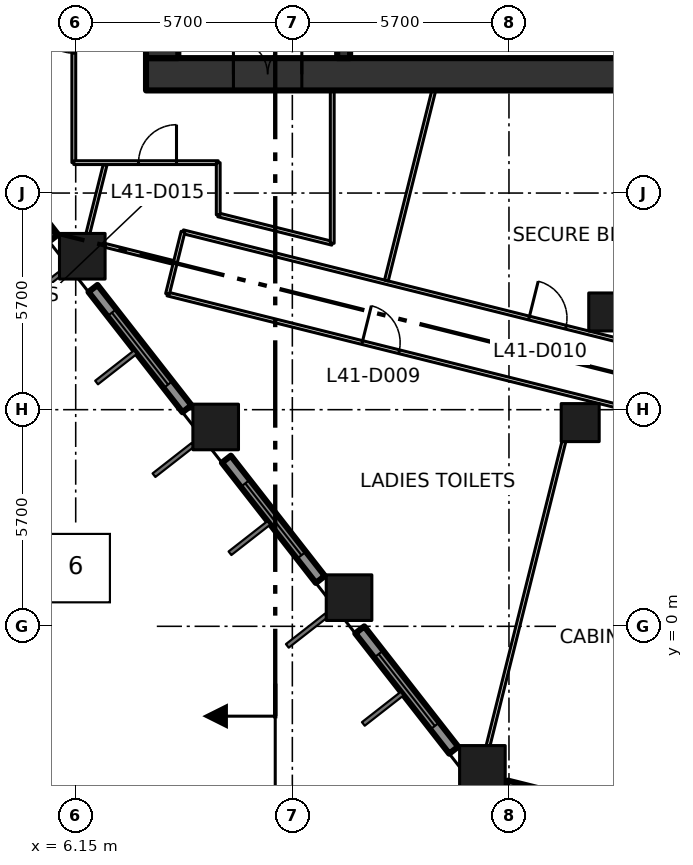
"""IFC4 building model, lengths in metres.
Left out: names, types, materials, properties, quantities, classifications, styles, units other than length and angle.
Written with IfcOpenShell. Run it as: python <this file> out.ifc"""

import sys

from ifc_helpers import new_model, si_unit, direction, frame, frame_2d, origin, origin_2d, place, context, subcontext, project, spatial, rectangle, extrude, element, fill, save


model = new_model("IFC4")
c1 = context("Model", 3, precision=1e-05, world=origin(), true_north=direction((0.0, 1.0)))
c2 = subcontext(c1, "Body", "Model", "MODEL_VIEW")
j1 = project(units=[si_unit("LENGTHUNIT", "METRE"), si_unit("PLANEANGLEUNIT", "RADIAN")], contexts=[c1])
p1 = place(None, origin())
s1 = spatial("IfcSite", under=j1, at=p1, CompositionType="ELEMENT")
p2 = place(p1, origin())
s2 = spatial("IfcBuilding", under=s1, at=p2, CompositionType="ELEMENT")
p3 = place(p2, frame((0.0, 0.0, 182.4)))
s3 = spatial("IfcBuildingStorey", under=s2, at=p3, CompositionType="ELEMENT", Elevation=182.4)
for number, where, z_axis, x_axis in (
    (1, (16.851, -3.738, 0.0), (0.0, 0.0, 1.0), (1.0, 0.0, 0.0)),
    (2, (13.342, 0.754, 0.0), (0.0, 0.0, 1.0), (1.0, 0.0, 0.0)),
    (3, (9.833, 5.245, 0.0), (0.0, 0.0, 1.0), (1.0, 0.0, 0.0)),
    (4, (6.323, 9.737, 0.0), (0.0, 0.0, 1.0), (1.0, 0.0, 0.0)),
):
    element("IfcColumn", number, at=place(p3, frame(where, z_axis=z_axis, x_axis=x_axis)), inside=s3, PredefinedType="COLUMN", context=c2, shape_type="SweptSolid", body=[
        extrude(rectangle(XDim=1.2, YDim=1.2, at=origin_2d()), origin(), (0.0, 0.0, 1.0), 4.2),
    ])
for number, where, z_axis, x_axis in (
    (5, (19.424, 5.36, 0.0), (0.0, 0.0, 1.0), (1.0, 0.0, 0.0)),
    (6, (20.149, 8.271, 0.0), (0.0, 0.0, 1.0), (1.0, 0.0, 0.0)),
):
    element("IfcColumn", number, at=place(p3, frame(where, z_axis=z_axis, x_axis=x_axis)), inside=s3, PredefinedType="COLUMN", context=c2, shape_type="SweptSolid", body=[
        extrude(rectangle(XDim=1.0, YDim=1.0, at=origin_2d()), origin(), (0.0, 0.0, 1.0), 4.2),
    ])
p4 = place(p3, frame((8.0, 14.525, -0.3), z_axis=(0.0, 0.0, 1.0), x_axis=(1.0, 0.0, 0.0)))
e7 = element("IfcWall", 7, at=p4, inside=s3, PredefinedType="SHEAR", context=c2, shape_type="SweptSolid", body=[
    extrude(rectangle(XDim=22.8, YDim=0.85, at=frame_2d((11.4, 0.0))), origin(), (0.0, 0.0, 1.0), 4.2),
])
p5 = place(p4, frame((2.3, 0.0, 0.3)))
e8 = element("IfcOpeningElement", 8, at=p5, cuts=e7, PredefinedType="OPENING", context=c2, shape_type="SweptSolid", body=[
    extrude(rectangle(XDim=1.8, YDim=2.1, at=frame_2d((0.9, 1.05))), frame((0.0, 0.435, 0.0), z_axis=(0.0, -1.0, 0.0), x_axis=(1.0, 0.0, 0.0)), (0.0, 0.0, 1.0), 0.87),
])
p6 = place(p3, frame((8.425, 14.95, -0.3), z_axis=(0.0, 0.0, 1.0), x_axis=(0.0, 1.0, 0.0)))
e9 = element("IfcWall", 9, at=p6, inside=s3, PredefinedType="SHEAR", context=c2, shape_type="SweptSolid", body=[
    extrude(rectangle(XDim=20.75, YDim=0.85, at=frame_2d((10.375, 0.0))), origin(), (0.0, 0.0, 1.0), 4.2),
])
p7 = place(p3, frame((13.2, 14.95, 0.0), z_axis=(0.0, 0.0, 1.0), x_axis=(0.0, 1.0, 0.0)))
e10 = element("IfcWall", 10, at=p7, inside=s3, PredefinedType="SHEAR", context=c2, shape_type="SweptSolid", body=[
    extrude(rectangle(XDim=20.75, YDim=0.34, at=frame_2d((10.375, 0.0))), origin(), (0.0, 0.0, 1.0), 3.9),
])
p8 = place(p7, frame((3.35, 0.0, 0.0)))
e11 = element("IfcOpeningElement", 11, at=p8, cuts=e10, PredefinedType="OPENING", context=c2, shape_type="SweptSolid", body=[
    extrude(rectangle(XDim=1.8, YDim=2.1, at=frame_2d((0.9, 1.05))), frame((0.0, 0.18, 0.0), z_axis=(0.0, -1.0, 0.0), x_axis=(1.0, 0.0, 0.0)), (0.0, 0.0, 1.0), 0.36),
])
p9 = place(p7, frame((11.45, 0.0, 0.0)))
e12 = element("IfcOpeningElement", 12, at=p9, cuts=e10, PredefinedType="OPENING", context=c2, shape_type="SweptSolid", body=[
    extrude(rectangle(XDim=1.2, YDim=2.1, at=frame_2d((0.6, 1.05))), frame((0.0, 0.18, 0.0), z_axis=(0.0, -1.0, 0.0), x_axis=(1.0, 0.0, 0.0)), (0.0, 0.0, 1.0), 0.36),
])
p10 = place(p3, frame((3.096, 13.381, 0.0), z_axis=(0.0, 0.0, 1.0), x_axis=(0.615563820493, -0.78808704018, 0.0)))
e13 = element("IfcWall", 13, at=p10, inside=s3, PredefinedType="SOLIDWALL", context=c2, shape_type="SweptSolid", body=[
    extrude(rectangle(XDim=4.016, YDim=0.3, at=frame_2d((2.008, 0.0))), origin(), (0.0, 0.0, 1.0), 3.15),
])
p11 = place(p10, frame((0.808, 0.0, 0.8)))
e14 = element("IfcOpeningElement", 14, at=p11, cuts=e13, PredefinedType="OPENING", context=c2, shape_type="SweptSolid", body=[
    extrude(rectangle(XDim=2.4, YDim=2.1, at=frame_2d((1.2, 1.05))), frame((0.0, 0.16, 0.0), z_axis=(0.0, -1.0, 0.0), x_axis=(1.0, 0.0, 0.0)), (0.0, 0.0, 1.0), 0.32),
])
p12 = place(p3, frame((6.605, 8.889, 0.0), z_axis=(0.0, 0.0, 1.0), x_axis=(0.615706559089, -0.787975528233, 0.0)))
e15 = element("IfcWall", 15, at=p12, inside=s3, PredefinedType="SOLIDWALL", context=c2, shape_type="SweptSolid", body=[
    extrude(rectangle(XDim=4.016, YDim=0.3, at=frame_2d((2.008, 0.0))), origin(), (0.0, 0.0, 1.0), 3.15),
])
p13 = place(p12, frame((0.808, 0.0, 0.8)))
e16 = element("IfcOpeningElement", 16, at=p13, cuts=e15, PredefinedType="OPENING", context=c2, shape_type="SweptSolid", body=[
    extrude(rectangle(XDim=2.4, YDim=2.1, at=frame_2d((1.2, 1.05))), frame((0.0, 0.16, 0.0), z_axis=(0.0, -1.0, 0.0), x_axis=(1.0, 0.0, 0.0)), (0.0, 0.0, 1.0), 0.32),
])
p14 = place(p3, frame((10.115, 4.397, 0.0), z_axis=(0.0, 0.0, 1.0), x_axis=(0.615644041972, -0.788024373725, 0.0)))
e17 = element("IfcWall", 17, at=p14, inside=s3, PredefinedType="SOLIDWALL", context=c2, shape_type="SweptSolid", body=[
    extrude(rectangle(XDim=4.015, YDim=0.3, at=frame_2d((2.008, 0.0))), origin(), (0.0, 0.0, 1.0), 3.15),
])
p15 = place(p14, frame((0.807, 0.0, 0.8)))
e18 = element("IfcOpeningElement", 18, at=p15, cuts=e17, PredefinedType="OPENING", context=c2, shape_type="SweptSolid", body=[
    extrude(rectangle(XDim=2.4, YDim=2.1, at=frame_2d((1.2, 1.05))), frame((0.0, 0.16, 0.0), z_axis=(0.0, -1.0, 0.0), x_axis=(1.0, 0.0, 0.0)), (0.0, 0.0, 1.0), 0.32),
])
p16 = place(p3, frame((13.624, -0.094, 0.0), z_axis=(0.0, 0.0, 1.0), x_axis=(0.615526062586, -0.7881165309, 0.0)))
e19 = element("IfcWall", 19, at=p16, inside=s3, PredefinedType="SOLIDWALL", context=c2, shape_type="SweptSolid", body=[
    extrude(rectangle(XDim=4.016, YDim=0.3, at=frame_2d((2.008, 0.0))), origin(), (0.0, 0.0, 1.0), 3.15),
])
p17 = place(p16, frame((0.808, 0.0, 0.8)))
e20 = element("IfcOpeningElement", 20, at=p17, cuts=e19, PredefinedType="OPENING", context=c2, shape_type="SweptSolid", body=[
    extrude(rectangle(XDim=2.4, YDim=2.1, at=frame_2d((1.2, 1.05))), frame((0.0, 0.16, 0.0), z_axis=(0.0, -1.0, 0.0), x_axis=(1.0, 0.0, 0.0)), (0.0, 0.0, 1.0), 0.32),
])
p18 = place(p3, frame((17.484, -4.205, 0.0), z_axis=(0.0, 0.0, 1.0), x_axis=(0.970318118028, -0.241832069473, 0.0)))
e21 = element("IfcWall", 21, at=p18, inside=s3, PredefinedType="SOLIDWALL", context=c2, shape_type="SweptSolid", body=[
    extrude(rectangle(XDim=4.246, YDim=0.3, at=frame_2d((2.123, 0.0))), origin(), (0.0, 0.0, 1.0), 3.15),
])
p19 = place(p18, frame((0.923, 0.0, 0.8)))
e22 = element("IfcOpeningElement", 22, at=p19, cuts=e21, PredefinedType="OPENING", context=c2, shape_type="SweptSolid", body=[
    extrude(rectangle(XDim=2.4, YDim=2.1, at=frame_2d((1.2, 1.05))), frame((0.0, 0.16, 0.0), z_axis=(0.0, -1.0, 0.0), x_axis=(1.0, 0.0, 0.0)), (0.0, 0.0, 1.0), 0.32),
])
p20 = place(p3, frame((6.1, 12.2, 0.0), z_axis=(0.0, 0.0, 1.0), x_axis=(0.0, 1.0, 0.0)))
e23 = element("IfcWall", 23, at=p20, inside=s3, PredefinedType="PARTITIONING", context=c2, shape_type="SweptSolid", body=[
    extrude(rectangle(XDim=26.7, YDim=0.1, at=frame_2d((13.35, 0.0))), origin(), (0.0, 0.0, 1.0), 3.9),
])
p21 = place(p20, frame((2.88, 0.0, 0.0)))
e24 = element("IfcOpeningElement", 24, at=p21, cuts=e23, PredefinedType="OPENING", context=c2, shape_type="SweptSolid", body=[
    extrude(rectangle(XDim=1.0, YDim=2.1, at=frame_2d((0.5, 1.05))), frame((0.0, 0.06, 0.0), z_axis=(0.0, -1.0, 0.0), x_axis=(1.0, 0.0, 0.0)), (0.0, 0.0, 1.0), 0.12),
])
p22 = place(p20, frame((11.578, 0.0, 0.0)))
e25 = element("IfcOpeningElement", 25, at=p22, cuts=e23, PredefinedType="OPENING", context=c2, shape_type="SweptSolid", body=[
    extrude(rectangle(XDim=1.0, YDim=2.1, at=frame_2d((0.5, 1.05))), frame((0.0, 0.06, 0.0), z_axis=(0.0, -1.0, 0.0), x_axis=(1.0, 0.0, 0.0)), (0.0, 0.0, 1.0), 0.12),
])
p23 = place(p3, frame((6.1, 12.2, 0.0), z_axis=(0.0, 0.0, 1.0), x_axis=(1.0, 0.0, 0.0)))
e26 = element("IfcWall", 26, at=p23, inside=s3, PredefinedType="PARTITIONING", context=c2, shape_type="SweptSolid", body=[
    extrude(rectangle(XDim=3.8, YDim=0.1, at=frame_2d((1.9, 0.0))), origin(), (0.0, 0.0, 1.0), 3.9),
])
p24 = place(p23, frame((1.702, 0.0, 0.0)))
e27 = element("IfcOpeningElement", 27, at=p24, cuts=e26, PredefinedType="OPENING", context=c2, shape_type="SweptSolid", body=[
    extrude(rectangle(XDim=1.0, YDim=2.1, at=frame_2d((0.5, 1.05))), frame((0.0, 0.06, 0.0), z_axis=(0.0, -1.0, 0.0), x_axis=(1.0, 0.0, 0.0)), (0.0, 0.0, 1.0), 0.12),
])
p25 = place(p3, frame((8.565, 8.744, 0.0), z_axis=(0.0, 0.0, 1.0), x_axis=(0.97029693432, -0.24191705035, 0.0)))
e28 = element("IfcWall", 28, at=p25, inside=s3, PredefinedType="PARTITIONING", context=c2, shape_type="SweptSolid", body=[
    extrude(rectangle(XDim=56.375, YDim=0.1, at=frame_2d((28.187, 0.0))), origin(), (0.0, 0.0, 1.0), 3.9),
])
p26 = place(p25, frame((42.739, 0.0, 0.0)))
e29 = element("IfcOpeningElement", 29, at=p26, cuts=e28, PredefinedType="OPENING", context=c2, shape_type="SweptSolid", body=[
    extrude(rectangle(XDim=1.8, YDim=2.1, at=frame_2d((0.9, 1.05))), frame((0.0, 0.06, 0.0), z_axis=(0.0, -1.0, 0.0), x_axis=(1.0, 0.0, 0.0)), (0.0, 0.0, 1.0), 0.12),
])
p27 = place(p25, frame((14.239, 0.0, 0.0)))
e30 = element("IfcOpeningElement", 30, at=p27, cuts=e28, PredefinedType="OPENING", context=c2, shape_type="SweptSolid", body=[
    extrude(rectangle(XDim=1.8, YDim=2.1, at=frame_2d((0.9, 1.05))), frame((0.0, 0.06, 0.0), z_axis=(0.0, -1.0, 0.0), x_axis=(1.0, 0.0, 0.0)), (0.0, 0.0, 1.0), 0.12),
])
p28 = place(p25, frame((29.74, 0.0, 0.0)))
e31 = element("IfcOpeningElement", 31, at=p28, cuts=e28, PredefinedType="OPENING", context=c2, shape_type="SweptSolid", body=[
    extrude(rectangle(XDim=1.8, YDim=2.1, at=frame_2d((0.9, 1.05))), frame((0.0, 0.06, 0.0), z_axis=(0.0, -1.0, 0.0), x_axis=(1.0, 0.0, 0.0)), (0.0, 0.0, 1.0), 0.12),
])
p29 = place(p25, frame((35.64, 0.0, 0.0)))
e32 = element("IfcOpeningElement", 32, at=p29, cuts=e28, PredefinedType="OPENING", context=c2, shape_type="SweptSolid", body=[
    extrude(rectangle(XDim=1.0, YDim=2.1, at=frame_2d((0.5, 1.05))), frame((0.0, 0.06, 0.0), z_axis=(0.0, -1.0, 0.0), x_axis=(1.0, 0.0, 0.0)), (0.0, 0.0, 1.0), 0.12),
])
p30 = place(p25, frame((5.28, 0.0, 0.0)))
e33 = element("IfcOpeningElement", 33, at=p30, cuts=e28, PredefinedType="OPENING", context=c2, shape_type="SweptSolid", body=[
    extrude(rectangle(XDim=1.0, YDim=2.1, at=frame_2d((0.5, 1.05))), frame((0.0, 0.06, 0.0), z_axis=(0.0, -1.0, 0.0), x_axis=(1.0, 0.0, 0.0)), (0.0, 0.0, 1.0), 0.12),
])
p31 = place(p3, frame((8.973, 10.382, 0.0), z_axis=(0.0, 0.0, 1.0), x_axis=(0.970286808807, -0.241957658808, 0.0)))
e34 = element("IfcWall", 34, at=p31, inside=s3, PredefinedType="PARTITIONING", context=c2, shape_type="SweptSolid", body=[
    extrude(rectangle(XDim=19.88, YDim=0.1, at=frame_2d((9.94, 0.0))), origin(), (0.0, 0.0, 1.0), 3.9),
])
p32 = place(p31, frame((9.384, 0.0, 0.0)))
e35 = element("IfcOpeningElement", 35, at=p32, cuts=e34, PredefinedType="OPENING", context=c2, shape_type="SweptSolid", body=[
    extrude(rectangle(XDim=1.0, YDim=2.1, at=frame_2d((0.5, 1.05))), frame((0.0, 0.06, 0.0), z_axis=(0.0, -1.0, 0.0), x_axis=(1.0, 0.0, 0.0)), (0.0, 0.0, 1.0), 0.12),
])
p33 = place(p3, frame((8.973, 10.382, 0.0), z_axis=(0.0, 0.0, 1.0), x_axis=(-0.241650823739, -0.970363271866, 0.0)))
e36 = element("IfcWall", 36, at=p33, inside=s3, PredefinedType="PARTITIONING", context=c2, shape_type="SweptSolid", body=[
    extrude(rectangle(XDim=1.688, YDim=0.1, at=frame_2d((0.844, 0.0))), origin(), (0.0, 0.0, 1.0), 3.9),
])
p34 = place(p3, frame((9.9, 10.826, 0.0), z_axis=(0.0, 0.0, 1.0), x_axis=(0.970290953223, -0.241941038466, 0.0)))
e37 = element("IfcWall", 37, at=p34, inside=s3, PredefinedType="PARTITIONING", context=c2, shape_type="SweptSolid", body=[
    extrude(rectangle(XDim=3.092, YDim=0.1, at=frame_2d((1.546, 0.0))), origin(), (0.0, 0.0, 1.0), 3.9),
])
p35 = place(p3, frame((9.9, 12.2, 0.0), z_axis=(0.0, 0.0, 1.0), x_axis=(0.0, -1.0, 0.0)))
e38 = element("IfcWall", 38, at=p35, inside=s3, PredefinedType="PARTITIONING", context=c2, shape_type="SweptSolid", body=[
    extrude(rectangle(XDim=1.374, YDim=0.1, at=frame_2d((0.687, 0.0))), origin(), (0.0, 0.0, 1.0), 3.9),
])
p36 = place(p3, frame((12.9, 10.078, 0.0), z_axis=(0.0, 0.0, 1.0), x_axis=(0.0, 1.0, 0.0)))
e39 = element("IfcWall", 39, at=p36, inside=s3, PredefinedType="PARTITIONING", context=c2, shape_type="SweptSolid", body=[
    extrude(rectangle(XDim=4.022, YDim=0.1, at=frame_2d((2.011, 0.0))), origin(), (0.0, 0.0, 1.0), 3.9),
])
p37 = place(p3, frame((6.922, 12.138, 0.0), z_axis=(0.0, 0.0, 1.0), x_axis=(-0.242504681353, -0.970150235542, 0.0)))
e40 = element("IfcWall", 40, at=p37, inside=s3, PredefinedType="PARTITIONING", context=c2, shape_type="SweptSolid", body=[
    extrude(rectangle(XDim=1.856, YDim=0.1, at=frame_2d((0.928, 0.0))), origin(), (0.0, 0.0, 1.0), 3.9),
])
p38 = place(p3, frame((8.72, 9.574, 0.0), z_axis=(0.0, 0.0, 1.0), x_axis=(-0.97017350799, 0.242411559945, 0.0)))
e41 = element("IfcWall", 41, at=p38, inside=s3, PredefinedType="PARTITIONING", context=c2, shape_type="SweptSolid", body=[
    extrude(rectangle(XDim=1.852, YDim=0.1, at=frame_2d((0.926, 0.0))), origin(), (0.0, 0.0, 1.0), 3.9),
])
p39 = place(p3, frame((14.325, 9.099, 0.0), z_axis=(0.0, 0.0, 1.0), x_axis=(0.241956019685, 0.970287217548, 0.0)))
e42 = element("IfcWall", 42, at=p39, inside=s3, PredefinedType="PARTITIONING", context=c2, shape_type="SweptSolid", body=[
    extrude(rectangle(XDim=5.154, YDim=0.1, at=frame_2d((2.577, 0.0))), origin(), (0.0, 0.0, 1.0), 3.9),
])
p40 = place(p3, frame((17.001, -3.138, 0.0), z_axis=(0.0, 0.0, 1.0), x_axis=(0.241922303467, 0.970295624583, 0.0)))
e43 = element("IfcWall", 43, at=p40, inside=s3, PredefinedType="PARTITIONING", context=c2, shape_type="SweptSolid", body=[
    extrude(rectangle(XDim=8.243, YDim=0.1, at=frame_2d((4.122, 0.0))), origin(), (0.0, 0.0, 1.0), 3.9),
])
p41 = place(p5, origin())
e44 = element("IfcDoor", 44, at=p41, inside=s3, OperationType="DOUBLE_DOOR_SINGLE_SWING", PredefinedType="DOOR", context=c2, shape_type="SweptSolid", body=[
    extrude(rectangle(XDim=1.8, YDim=2.1, at=frame_2d((0.9, 1.05))), frame((0.0, 0.025, 0.0), z_axis=(0.0, -1.0, 0.0), x_axis=(1.0, 0.0, 0.0)), (0.0, 0.0, 1.0), 0.05),
])
fill(e8, e44)
p42 = place(p13, origin())
e45 = element("IfcWindow", 45, at=p42, inside=s3, PartitioningType="DOUBLE_PANEL_VERTICAL", PredefinedType="WINDOW", context=c2, shape_type="SweptSolid", body=[
    extrude(rectangle(XDim=2.4, YDim=2.1, at=frame_2d((1.2, 1.05))), frame((0.0, 0.03, 0.0), z_axis=(0.0, -1.0, 0.0), x_axis=(1.0, 0.0, 0.0)), (0.0, 0.0, 1.0), 0.06),
])
fill(e16, e45)
p43 = place(p15, origin())
e46 = element("IfcWindow", 46, at=p43, inside=s3, PartitioningType="DOUBLE_PANEL_VERTICAL", PredefinedType="WINDOW", context=c2, shape_type="SweptSolid", body=[
    extrude(rectangle(XDim=2.4, YDim=2.1, at=frame_2d((1.2, 1.05))), frame((0.0, 0.03, 0.0), z_axis=(0.0, -1.0, 0.0), x_axis=(1.0, 0.0, 0.0)), (0.0, 0.0, 1.0), 0.06),
])
fill(e18, e46)
p44 = place(p17, origin())
e47 = element("IfcWindow", 47, at=p44, inside=s3, PartitioningType="DOUBLE_PANEL_VERTICAL", PredefinedType="WINDOW", context=c2, shape_type="SweptSolid", body=[
    extrude(rectangle(XDim=2.4, YDim=2.1, at=frame_2d((1.2, 1.05))), frame((0.0, 0.03, 0.0), z_axis=(0.0, -1.0, 0.0), x_axis=(1.0, 0.0, 0.0)), (0.0, 0.0, 1.0), 0.06),
])
fill(e20, e47)
p45 = place(p30, origin())
e48 = element("IfcDoor", 48, at=p45, inside=s3, OperationType="SINGLE_SWING_LEFT", PredefinedType="DOOR", context=c2, shape_type="SweptSolid", body=[
    extrude(rectangle(XDim=1.0, YDim=2.1, at=frame_2d((0.5, 1.05))), frame((0.0, 0.025, 0.0), z_axis=(0.0, -1.0, 0.0), x_axis=(1.0, 0.0, 0.0)), (0.0, 0.0, 1.0), 0.05),
])
fill(e33, e48)
p46 = place(p32, origin())
e49 = element("IfcDoor", 49, at=p46, inside=s3, OperationType="SINGLE_SWING_LEFT", PredefinedType="DOOR", context=c2, shape_type="SweptSolid", body=[
    extrude(rectangle(XDim=1.0, YDim=2.1, at=frame_2d((0.5, 1.05))), frame((0.0, 0.025, 0.0), z_axis=(0.0, -1.0, 0.0), x_axis=(1.0, 0.0, 0.0)), (0.0, 0.0, 1.0), 0.05),
])
fill(e35, e49)
p47 = place(p21, origin())
e50 = element("IfcDoor", 50, at=p47, inside=s3, OperationType="SINGLE_SWING_RIGHT", PredefinedType="DOOR", context=c2, shape_type="SweptSolid", body=[
    extrude(rectangle(XDim=1.0, YDim=2.1, at=frame_2d((0.5, 1.05))), frame((0.0, 0.025, 0.0), z_axis=(0.0, -1.0, 0.0), x_axis=(1.0, 0.0, 0.0)), (0.0, 0.0, 1.0), 0.05),
])
fill(e24, e50)
p48 = place(p24, origin())
e51 = element("IfcDoor", 51, at=p48, inside=s3, OperationType="SINGLE_SWING_RIGHT", PredefinedType="DOOR", context=c2, shape_type="SweptSolid", body=[
    extrude(rectangle(XDim=1.0, YDim=2.1, at=frame_2d((0.5, 1.05))), frame((0.0, 0.025, 0.0), z_axis=(0.0, -1.0, 0.0), x_axis=(1.0, 0.0, 0.0)), (0.0, 0.0, 1.0), 0.05),
])
fill(e27, e51)
save(model, sys.argv[1])
